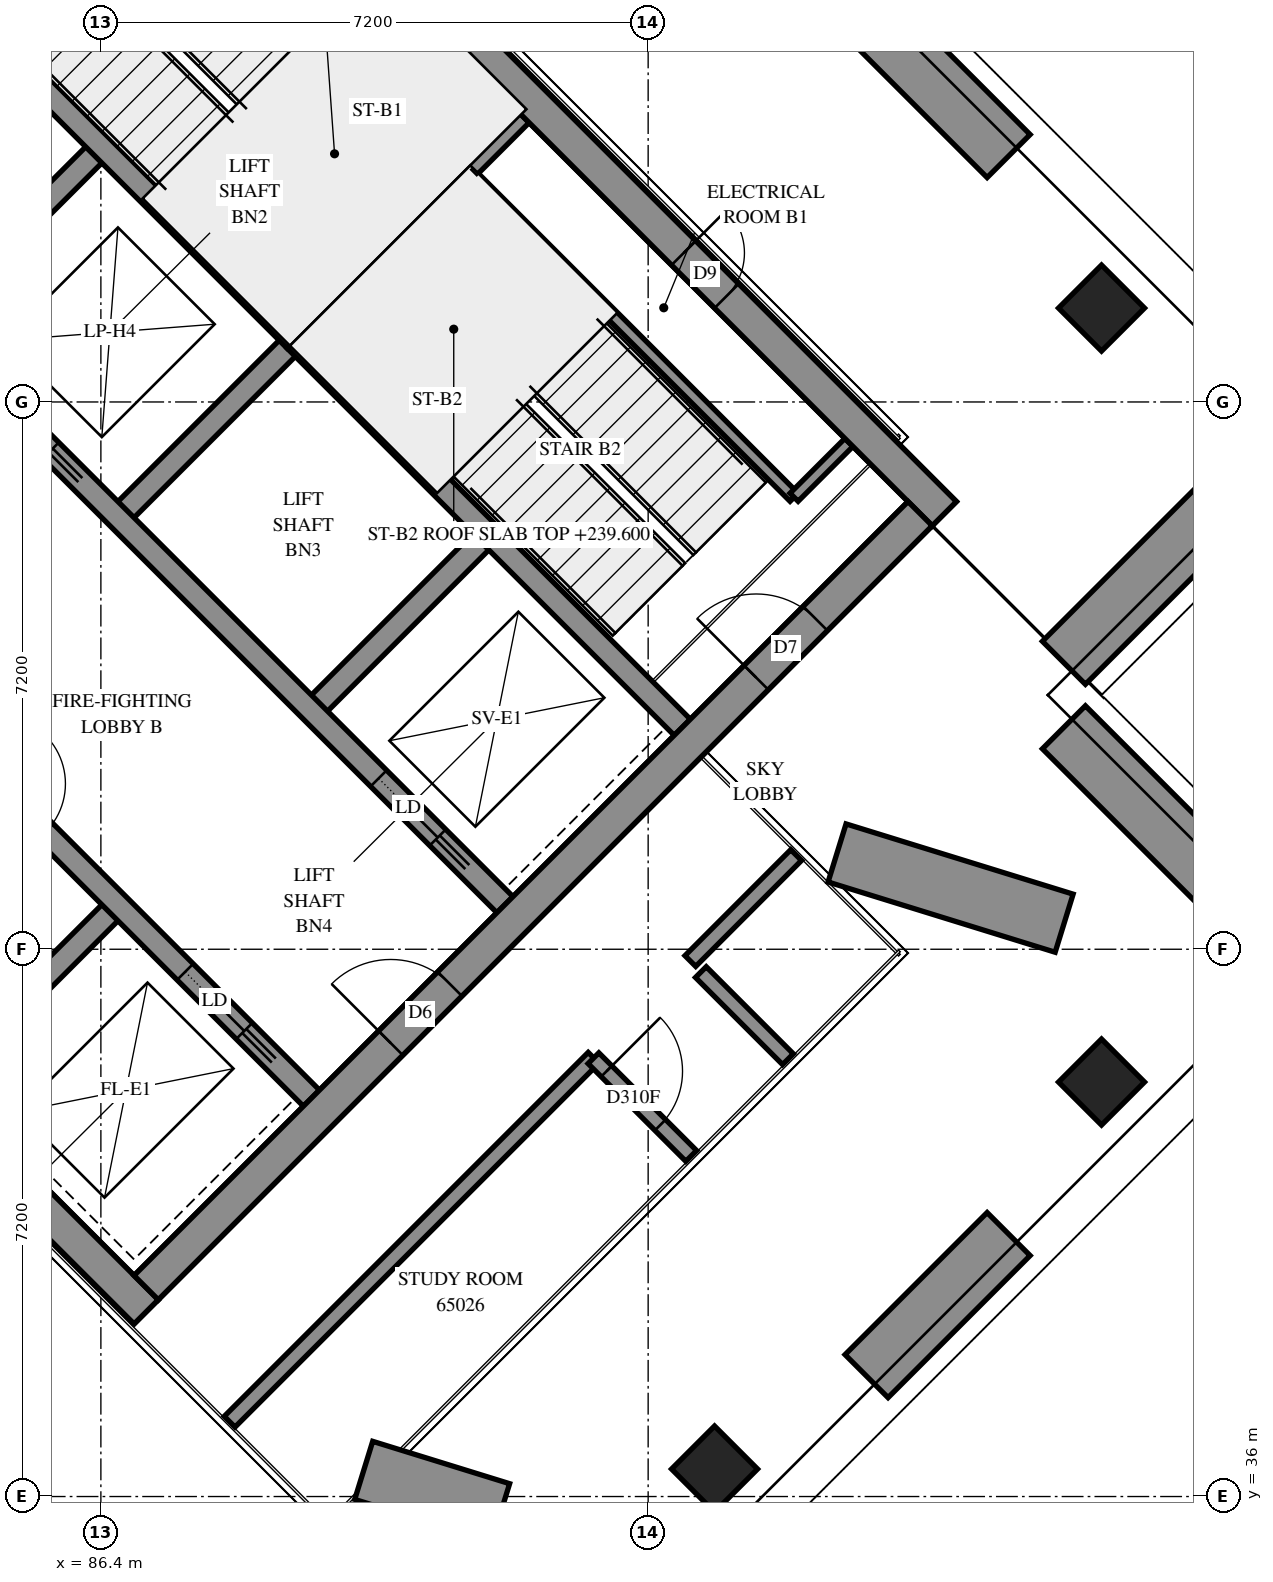
"""IFC4 building model, lengths in metres.
Left out: names, types, materials, properties, quantities, classifications, styles, units other than length and angle.
Written with IfcOpenShell. Run it as: python <this file> out.ifc"""

import sys

from ifc_helpers import new_model, si_unit, direction, frame, frame_2d, origin, origin_2d, place, context, subcontext, project, spatial, rectangle, extrude, element, fill, save


model = new_model("IFC4")
c1 = context("Model", 3, precision=1e-05, world=origin(), true_north=direction((0.0, 1.0)))
c2 = subcontext(c1, "Body", "Model", "MODEL_VIEW")
j1 = project(units=[si_unit("LENGTHUNIT", "METRE"), si_unit("PLANEANGLEUNIT", "RADIAN")], contexts=[c1])
p1 = place(None, origin())
s1 = spatial("IfcSite", under=j1, at=p1, CompositionType="ELEMENT")
p2 = place(p1, origin())
s2 = spatial("IfcBuilding", under=s1, at=p2, CompositionType="ELEMENT")
p3 = place(p2, frame((0.0, 0.0, 239.6)))
s3 = spatial("IfcBuildingStorey", under=s2, at=p3, CompositionType="ELEMENT", Elevation=239.6)
for number, where, z_axis, x_axis in (
    (1, (99.565, 51.635, 0.0), (0.0, 0.0, 1.0), (0.707, -0.707, 0.0)),
    (2, (99.565, 41.453, 0.0), (0.0, 0.0, 1.0), (0.707, -0.707, 0.0)),
    (3, (94.474, 36.362, 0.0), (0.0, 0.0, 1.0), (0.707, -0.707, 0.0)),
):
    element("IfcColumn", number, at=place(p3, frame(where, z_axis=z_axis, x_axis=x_axis)), inside=s3, PredefinedType="COLUMN", context=c2, shape_type="SweptSolid", body=[
        extrude(rectangle(XDim=0.8, YDim=0.8, at=origin_2d()), origin(), (0.0, 0.0, 1.0), 3.9),
    ])
p4 = place(p3, frame((76.177, 49.249, -0.3), z_axis=(0.0, 0.0, 1.0), x_axis=(0.7071100491, -0.7071035132, 0.0)))
e4 = element("IfcWall", 4, at=p4, inside=s3, PredefinedType="SHEAR", context=c2, shape_type="SweptSolid", body=[
    extrude(rectangle(XDim=15.3, YDim=0.45, at=frame_2d((7.65, 0.0))), origin(), (0.0, 0.0, 1.0), 3.5),
])
p5 = place(p3, frame((86.678, 59.749, -0.3), z_axis=(0.0, 0.0, 1.0), x_axis=(0.7071035132, -0.7071100491, 0.0)))
e5 = element("IfcWall", 5, at=p5, inside=s3, PredefinedType="SHEAR", context=c2, shape_type="SweptSolid", body=[
    extrude(rectangle(XDim=15.3, YDim=0.45, at=frame_2d((7.65, 0.0))), origin(), (0.0, 0.0, 1.0), 3.5),
])
p6 = place(p5, frame((10.45, 0.0, 0.3)))
e6 = element("IfcOpeningElement", 6, at=p6, cuts=e5, PredefinedType="OPENING", context=c2, shape_type="SweptSolid", body=[
    extrude(rectangle(XDim=0.8, YDim=2.1, at=frame_2d((0.4, 1.05))), frame((0.0, 0.235, 0.0), z_axis=(0.0, -1.0, 0.0), x_axis=(1.0, 0.0, 0.0)), (0.0, 0.0, 1.0), 0.47),
])
p7 = place(p3, frame((76.495, 49.249, -0.3), z_axis=(0.0, 0.0, 1.0), x_axis=(0.7071067812, 0.7071067812, 0.0)))
e7 = element("IfcWall", 7, at=p7, inside=s3, PredefinedType="SHEAR", context=c2, shape_type="SweptSolid", body=[
    extrude(rectangle(XDim=14.4, YDim=0.45, at=frame_2d((7.2, 0.0))), origin(), (0.0, 0.0, 1.0), 3.5),
])
p8 = place(p7, frame((4.55, 0.0, 0.3)))
e8 = element("IfcOpeningElement", 8, at=p8, cuts=e7, PredefinedType="OPENING", context=c2, shape_type="SweptSolid", body=[
    extrude(rectangle(XDim=1.1, YDim=2.1, at=frame_2d((0.55, 1.05))), frame((0.0, 0.235, 0.0), z_axis=(0.0, -1.0, 0.0), x_axis=(1.0, 0.0, 0.0)), (0.0, 0.0, 1.0), 0.47),
])
p9 = place(p7, frame((11.35, 0.0, 0.3)))
e9 = element("IfcOpeningElement", 9, at=p9, cuts=e7, PredefinedType="OPENING", context=c2, shape_type="SweptSolid", body=[
    extrude(rectangle(XDim=1.1, YDim=2.1, at=frame_2d((0.55, 1.05))), frame((0.0, 0.235, 0.0), z_axis=(0.0, -1.0, 0.0), x_axis=(1.0, 0.0, 0.0)), (0.0, 0.0, 1.0), 0.47),
])
p10 = place(p3, frame((86.996, 38.748, -0.3), z_axis=(0.0, 0.0, 1.0), x_axis=(0.7071067812, 0.7071067812, 0.0)))
e10 = element("IfcWall", 10, at=p10, inside=s3, PredefinedType="SHEAR", context=c2, shape_type="SweptSolid", body=[
    extrude(rectangle(XDim=14.4, YDim=0.45, at=frame_2d((7.2, 0.0))), origin(), (0.0, 0.0, 1.0), 3.5),
])
p11 = place(p10, frame((4.55, 0.0, 0.3)))
e11 = element("IfcOpeningElement", 11, at=p11, cuts=e10, PredefinedType="OPENING", context=c2, shape_type="SweptSolid", body=[
    extrude(rectangle(XDim=1.1, YDim=2.1, at=frame_2d((0.55, 1.05))), frame((0.0, 0.235, 0.0), z_axis=(0.0, -1.0, 0.0), x_axis=(1.0, 0.0, 0.0)), (0.0, 0.0, 1.0), 0.47),
])
p12 = place(p10, frame((11.35, 0.0, 0.3)))
e12 = element("IfcOpeningElement", 12, at=p12, cuts=e10, PredefinedType="OPENING", context=c2, shape_type="SweptSolid", body=[
    extrude(rectangle(XDim=1.1, YDim=2.1, at=frame_2d((0.55, 1.05))), frame((0.0, 0.235, 0.0), z_axis=(0.0, -1.0, 0.0), x_axis=(1.0, 0.0, 0.0)), (0.0, 0.0, 1.0), 0.47),
])
p13 = place(p3, frame((84.079, 51.423, 0.0), z_axis=(0.0, 0.0, 1.0), x_axis=(0.7071219326, 0.7070916295, 0.0)))
e13 = element("IfcWall", 13, at=p13, inside=s3, PredefinedType="SOLIDWALL", context=c2, shape_type="SweptSolid", body=[
    extrude(rectangle(XDim=3.3, YDim=0.3, at=frame_2d((1.65, 0.0))), origin(), (0.0, 0.0, 1.0), 3.9),
])
p14 = place(p3, frame((86.625, 48.878, 0.0), z_axis=(0.0, 0.0, 1.0), x_axis=(0.7071067812, 0.7071067812, 0.0)))
e14 = element("IfcWall", 14, at=p14, inside=s3, PredefinedType="SOLIDWALL", context=c2, shape_type="SweptSolid", body=[
    extrude(rectangle(XDim=3.3, YDim=0.3, at=frame_2d((1.65, 0.0))), origin(), (0.0, 0.0, 1.0), 3.9),
])
p15 = place(p3, frame((84.291, 41.453, 0.0), z_axis=(0.0, 0.0, 1.0), x_axis=(0.7071067812, 0.7071067812, 0.0)))
e15 = element("IfcWall", 15, at=p15, inside=s3, PredefinedType="SOLIDWALL", context=c2, shape_type="SweptSolid", body=[
    extrude(rectangle(XDim=3.3, YDim=0.3, at=frame_2d((1.65, 0.0))), origin(), (0.0, 0.0, 1.0), 3.9),
])
p16 = place(p3, frame((89.17, 46.332, 0.0), z_axis=(0.0, 0.0, 1.0), x_axis=(0.7071067812, 0.7071067812, 0.0)))
e16 = element("IfcWall", 16, at=p16, inside=s3, PredefinedType="SOLIDWALL", context=c2, shape_type="SweptSolid", body=[
    extrude(rectangle(XDim=3.3, YDim=0.3, at=frame_2d((1.65, 0.0))), origin(), (0.0, 0.0, 1.0), 3.9),
])
p17 = place(p3, frame((78.988, 51.423, 0.0), z_axis=(0.0, 0.0, 1.0), x_axis=(0.7071067812, -0.7071067812, 0.0)))
e17 = element("IfcWall", 17, at=p17, inside=s3, PredefinedType="SOLIDWALL", context=c2, shape_type="SweptSolid", body=[
    extrude(rectangle(XDim=14.4, YDim=0.3, at=frame_2d((7.2, 0.0))), origin(), (0.0, 0.0, 1.0), 3.9),
])
p18 = place(p17, frame((1.35, 0.0, 0.0)))
e18 = element("IfcOpeningElement", 18, at=p18, cuts=e17, PredefinedType="OPENING", context=c2, shape_type="SweptSolid", body=[
    extrude(rectangle(XDim=0.9, YDim=2.1, at=frame_2d((0.45, 1.05))), frame((0.0, 0.16, 0.0), z_axis=(0.0, -1.0, 0.0), x_axis=(1.0, 0.0, 0.0)), (0.0, 0.0, 1.0), 0.32),
])
p19 = place(p17, frame((4.95, 0.0, 0.0)))
e19 = element("IfcOpeningElement", 19, at=p19, cuts=e17, PredefinedType="OPENING", context=c2, shape_type="SweptSolid", body=[
    extrude(rectangle(XDim=0.9, YDim=2.1, at=frame_2d((0.45, 1.05))), frame((0.0, 0.16, 0.0), z_axis=(0.0, -1.0, 0.0), x_axis=(1.0, 0.0, 0.0)), (0.0, 0.0, 1.0), 0.32),
])
p20 = place(p17, frame((8.55, 0.0, 0.0)))
e20 = element("IfcOpeningElement", 20, at=p20, cuts=e17, PredefinedType="OPENING", context=c2, shape_type="SweptSolid", body=[
    extrude(rectangle(XDim=0.9, YDim=2.1, at=frame_2d((0.45, 1.05))), frame((0.0, 0.16, 0.0), z_axis=(0.0, -1.0, 0.0), x_axis=(1.0, 0.0, 0.0)), (0.0, 0.0, 1.0), 0.32),
])
p21 = place(p17, frame((12.05, 0.0, 0.0)))
e21 = element("IfcOpeningElement", 21, at=p21, cuts=e17, PredefinedType="OPENING", context=c2, shape_type="SweptSolid", body=[
    extrude(rectangle(XDim=1.1, YDim=2.1, at=frame_2d((0.55, 1.05))), frame((0.0, 0.16, 0.0), z_axis=(0.0, -1.0, 0.0), x_axis=(1.0, 0.0, 0.0)), (0.0, 0.0, 1.0), 0.32),
])
p22 = place(p3, frame((81.534, 53.969, 0.0), z_axis=(0.0, 0.0, 1.0), x_axis=(0.707103309, -0.7071102534, 0.0)))
e22 = element("IfcWall", 22, at=p22, inside=s3, PredefinedType="SOLIDWALL", context=c2, shape_type="SweptSolid", body=[
    extrude(rectangle(XDim=14.4, YDim=0.3, at=frame_2d((7.2, 0.0))), origin(), (0.0, 0.0, 1.0), 3.9),
])
p23 = place(p22, frame((1.25, 0.0, 0.0)))
e23 = element("IfcOpeningElement", 23, at=p23, cuts=e22, PredefinedType="OPENING", context=c2, shape_type="SweptSolid", body=[
    extrude(rectangle(XDim=1.1, YDim=2.1, at=frame_2d((0.55, 1.05))), frame((0.0, 0.16, 0.0), z_axis=(0.0, -1.0, 0.0), x_axis=(1.0, 0.0, 0.0)), (0.0, 0.0, 1.0), 0.32),
])
p24 = place(p22, frame((4.85, 0.0, 0.0)))
e24 = element("IfcOpeningElement", 24, at=p24, cuts=e22, PredefinedType="OPENING", context=c2, shape_type="SweptSolid", body=[
    extrude(rectangle(XDim=1.1, YDim=2.1, at=frame_2d((0.55, 1.05))), frame((0.0, 0.16, 0.0), z_axis=(0.0, -1.0, 0.0), x_axis=(1.0, 0.0, 0.0)), (0.0, 0.0, 1.0), 0.32),
])
p25 = place(p22, frame((12.05, 0.0, 0.0)))
e25 = element("IfcOpeningElement", 25, at=p25, cuts=e22, PredefinedType="OPENING", context=c2, shape_type="SweptSolid", body=[
    extrude(rectangle(XDim=1.1, YDim=2.1, at=frame_2d((0.55, 1.05))), frame((0.0, 0.16, 0.0), z_axis=(0.0, -1.0, 0.0), x_axis=(1.0, 0.0, 0.0)), (0.0, 0.0, 1.0), 0.32),
])
for number, where, z_axis, x_axis in (
    (26, (83.867, 56.302, 0.0), (0.0, 0.0, 1.0), (0.707, -0.707, 0.0)),
    (27, (88.958, 51.211, 0.0), (0.0, 0.0, 1.0), (0.707, -0.707, 0.0)),
):
    element("IfcWall", number, at=place(p3, frame(where, z_axis=z_axis, x_axis=x_axis)), inside=s3, PredefinedType="SOLIDWALL", context=c2, shape_type="SweptSolid", body=[
        extrude(rectangle(XDim=7.2, YDim=0.3, at=frame_2d((3.6, 0.0))), origin(), (0.0, 0.0, 1.0), 3.9),
    ])
p26 = place(p3, frame((88.958, 51.211, 0.0), z_axis=(0.0, 0.0, 1.0), x_axis=(0.7071067812, 0.7071067812, 0.0)))
e28 = element("IfcWall", 28, at=p26, inside=s3, PredefinedType="SOLIDWALL", context=c2, shape_type="SweptSolid", body=[
    extrude(rectangle(XDim=4.2, YDim=0.3, at=frame_2d((2.1, 0.0))), origin(), (0.0, 0.0, 1.0), 3.9),
])
p27 = place(p3, frame((96.474, 37.584, 0.0), z_axis=(0.0, 0.0, 1.0), x_axis=(0.7071067812, 0.7071067812, 0.0)))
e29 = element("IfcWall", 29, at=p27, inside=s3, PredefinedType="SOLIDWALL", context=c2, shape_type="SweptSolid", body=[
    extrude(rectangle(XDim=2.643, YDim=0.8, at=frame_2d((1.322, 0.0))), origin(), (0.0, 0.0, 1.0), 0.65),
])
p28 = place(p3, frame((101.615, 43.574, 0.0), z_axis=(0.0, 0.0, 1.0), x_axis=(-0.707092892, 0.7071206701, 0.0)))
e30 = element("IfcWall", 30, at=p28, inside=s3, PredefinedType="SOLIDWALL", context=c2, shape_type="SweptSolid", body=[
    extrude(rectangle(XDim=3.6, YDim=0.8, at=frame_2d((1.8, 0.0))), origin(), (0.0, 0.0, 1.0), 0.65),
])
p29 = place(p3, frame((99.07, 46.968, 0.0), z_axis=(0.0, 0.0, 1.0), x_axis=(0.7071067812, 0.7071067812, 0.0)))
e31 = element("IfcWall", 31, at=p29, inside=s3, PredefinedType="SOLIDWALL", context=c2, shape_type="SweptSolid", body=[
    extrude(rectangle(XDim=3.6, YDim=0.8, at=frame_2d((1.8, 0.0))), origin(), (0.0, 0.0, 1.0), 0.65),
])
p30 = place(p3, frame((98.343, 53.635, 0.0), z_axis=(0.0, 0.0, 1.0), x_axis=(-0.7071067812, 0.7071067812, 0.0)))
e32 = element("IfcWall", 32, at=p30, inside=s3, PredefinedType="SOLIDWALL", context=c2, shape_type="SweptSolid", body=[
    extrude(rectangle(XDim=2.643, YDim=0.8, at=frame_2d((1.322, 0.0))), origin(), (0.0, 0.0, 1.0), 0.65),
])
p31 = place(p3, frame((99.073, 43.543, 0.0), z_axis=(0.0, 0.0, 1.0), x_axis=(-0.9553611302, 0.295440537, 0.0)))
e33 = element("IfcWall", 33, at=p31, inside=s3, PredefinedType="SOLIDWALL", context=c2, shape_type="SweptSolid", body=[
    extrude(rectangle(XDim=3.127, YDim=0.8, at=frame_2d((1.564, 0.0))), origin(), (0.0, 0.0, 1.0), 0.65),
])
p32 = place(p3, frame((91.659, 35.787, 0.0), z_axis=(0.0, 0.0, 1.0), x_axis=(-0.9553618261, 0.2954382866, 0.0)))
e34 = element("IfcWall", 34, at=p32, inside=s3, PredefinedType="SOLIDWALL", context=c2, shape_type="SweptSolid", body=[
    extrude(rectangle(XDim=1.886, YDim=0.8, at=frame_2d((0.943, 0.0))), origin(), (0.0, 0.0, 1.0), 0.65),
])
p33 = place(p3, frame((91.313, 53.354, 0.0), z_axis=(0.0, 0.0, 1.0), x_axis=(0.7071067812, -0.7071067812, 0.0)))
e35 = element("IfcWall", 35, at=p33, inside=s3, PredefinedType="PARTITIONING", context=c2, shape_type="SweptSolid", body=[
    extrude(rectangle(XDim=5.95, YDim=0.15, at=frame_2d((2.975, 0.0))), origin(), (0.0, 0.0, 1.0), 3.9),
])
p34 = place(p3, frame((95.52, 49.146, 0.0), z_axis=(0.0, 0.0, 1.0), x_axis=(0.7071067812, 0.7071067812, 0.0)))
e36 = element("IfcWall", 36, at=p34, inside=s3, PredefinedType="PARTITIONING", context=c2, shape_type="SweptSolid", body=[
    extrude(rectangle(XDim=1.02, YDim=0.15, at=frame_2d((0.51, 0.0))), origin(), (0.0, 0.0, 1.0), 3.9),
])
p35 = place(p3, frame((88.094, 36.984, 0.0), z_axis=(0.0, 0.0, 1.0), x_axis=(0.7071067812, 0.7071067812, 0.0)))
e37 = element("IfcWall", 37, at=p35, inside=s3, PredefinedType="PARTITIONING", context=c2, shape_type="SweptSolid", body=[
    extrude(rectangle(XDim=6.771, YDim=0.2, at=frame_2d((3.386, 0.0))), origin(), (0.0, 0.0, 1.0), 3.9),
])
p36 = place(p3, frame((94.155, 43.045, 0.0), z_axis=(0.0, 0.0, 1.0), x_axis=(0.7065989848, 0.7076142132, 0.0)))
e38 = element("IfcWall", 38, at=p36, inside=s3, PredefinedType="PARTITIONING", context=c2, shape_type="SweptSolid", body=[
    extrude(rectangle(XDim=1.97, YDim=0.2, at=frame_2d((0.985, 0.0))), origin(), (0.0, 0.0, 1.0), 3.9),
])
p37 = place(p3, frame((92.881, 41.767, 0.0), z_axis=(0.0, 0.0, 1.0), x_axis=(0.7071067812, -0.7071067812, 0.0)))
e39 = element("IfcWall", 39, at=p37, inside=s3, PredefinedType="PARTITIONING", context=c2, shape_type="SweptSolid", body=[
    extrude(rectangle(XDim=1.819, YDim=0.2, at=frame_2d((0.909, 0.0))), origin(), (0.0, 0.0, 1.0), 3.9),
])
p38 = place(p37, frame((0.243, 0.0, 0.0)))
e40 = element("IfcOpeningElement", 40, at=p38, cuts=e39, PredefinedType="OPENING", context=c2, shape_type="SweptSolid", body=[
    extrude(rectangle(XDim=1.0, YDim=2.1, at=frame_2d((0.5, 1.05))), frame((0.0, 0.11, 0.0), z_axis=(0.0, -1.0, 0.0), x_axis=(1.0, 0.0, 0.0)), (0.0, 0.0, 1.0), 0.22),
])
p39 = place(p3, frame((94.293, 42.899, 0.0), z_axis=(0.0, 0.0, 1.0), x_axis=(0.7071067812, -0.7071067812, 0.0)))
e41 = element("IfcWall", 41, at=p39, inside=s3, PredefinedType="PARTITIONING", context=c2, shape_type="SweptSolid", body=[
    extrude(rectangle(XDim=1.621, YDim=0.2, at=frame_2d((0.81, 0.0))), origin(), (0.0, 0.0, 1.0), 3.9),
])
p40 = place(p6, origin())
e42 = element("IfcDoor", 42, at=p40, inside=s3, OperationType="SINGLE_SWING_RIGHT", PredefinedType="DOOR", context=c2, shape_type="SweptSolid", body=[
    extrude(rectangle(XDim=0.8, YDim=2.1, at=frame_2d((0.4, 1.05))), frame((0.0, 0.025, 0.0), z_axis=(0.0, -1.0, 0.0), x_axis=(1.0, 0.0, 0.0)), (0.0, 0.0, 1.0), 0.05),
])
fill(e6, e42)
p41 = place(p11, origin())
e43 = element("IfcDoor", 43, at=p41, inside=s3, OperationType="DOUBLE_DOOR_SINGLE_SWING", PredefinedType="DOOR", context=c2, shape_type="SweptSolid", body=[
    extrude(rectangle(XDim=1.1, YDim=2.1, at=frame_2d((0.55, 1.05))), frame((0.0, 0.025, 0.0), z_axis=(0.0, -1.0, 0.0), x_axis=(1.0, 0.0, 0.0)), (0.0, 0.0, 1.0), 0.05),
])
fill(e11, e43)
p42 = place(p12, origin())
e44 = element("IfcDoor", 44, at=p42, inside=s3, OperationType="SINGLE_SWING_RIGHT", PredefinedType="DOOR", context=c2, shape_type="SweptSolid", body=[
    extrude(rectangle(XDim=1.1, YDim=2.1, at=frame_2d((0.55, 1.05))), frame((0.0, 0.025, 0.0), z_axis=(0.0, -1.0, 0.0), x_axis=(1.0, 0.0, 0.0)), (0.0, 0.0, 1.0), 0.05),
])
fill(e12, e44)
p43 = place(p21, origin())
e45 = element("IfcDoor", 45, at=p43, inside=s3, OperationType="SLIDING_TO_RIGHT", PredefinedType="DOOR", context=c2, shape_type="SweptSolid", body=[
    extrude(rectangle(XDim=1.1, YDim=2.1, at=frame_2d((0.55, 1.05))), frame((0.0, 0.025, 0.0), z_axis=(0.0, -1.0, 0.0), x_axis=(1.0, 0.0, 0.0)), (0.0, 0.0, 1.0), 0.05),
])
fill(e21, e45)
p44 = place(p25, origin())
e46 = element("IfcDoor", 46, at=p44, inside=s3, OperationType="SLIDING_TO_RIGHT", PredefinedType="DOOR", context=c2, shape_type="SweptSolid", body=[
    extrude(rectangle(XDim=1.1, YDim=2.1, at=frame_2d((0.55, 1.05))), frame((0.0, 0.025, 0.0), z_axis=(0.0, -1.0, 0.0), x_axis=(1.0, 0.0, 0.0)), (0.0, 0.0, 1.0), 0.05),
])
fill(e25, e46)
p45 = place(p38, origin())
e47 = element("IfcDoor", 47, at=p45, inside=s3, OperationType="SINGLE_SWING_LEFT", PredefinedType="DOOR", context=c2, shape_type="SweptSolid", body=[
    extrude(rectangle(XDim=1.0, YDim=2.1, at=frame_2d((0.5, 1.05))), frame((0.0, 0.025, 0.0), z_axis=(0.0, -1.0, 0.0), x_axis=(1.0, 0.0, 0.0)), (0.0, 0.0, 1.0), 0.05),
])
fill(e40, e47)
save(model, sys.argv[1])
